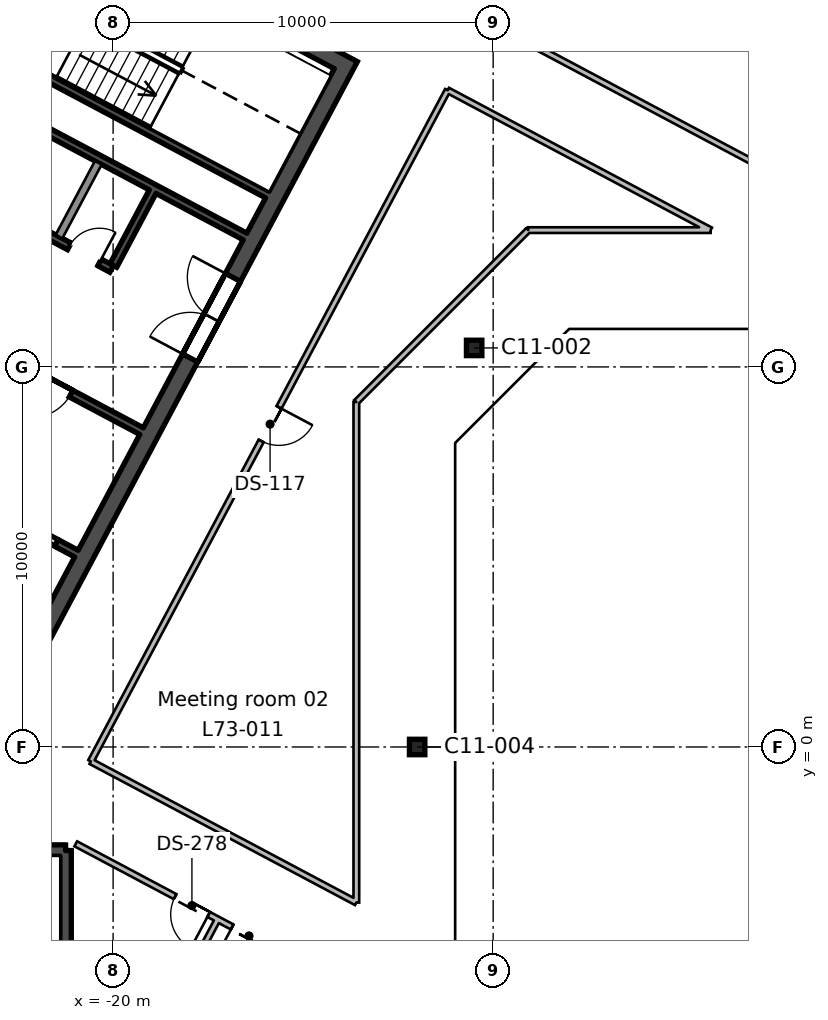
"""IFC4 building model, lengths in metres.
Left out: names, types, materials, properties, quantities, classifications, styles, units other than length and angle.
Written with IfcOpenShell. Run it as: python <this file> out.ifc"""

import sys

from ifc_helpers import new_model, si_unit, direction, frame, frame_2d, origin, origin_2d, place, context, subcontext, project, spatial, rectangle, hollow_rectangle, extrude, element, fill, save


model = new_model("IFC4")
c1 = context("Model", 3, precision=1e-05, world=origin(), true_north=direction((0.0, 1.0)))
c2 = subcontext(c1, "Body", "Model", "MODEL_VIEW")
j1 = project(units=[si_unit("LENGTHUNIT", "METRE"), si_unit("PLANEANGLEUNIT", "RADIAN")], contexts=[c1])
p1 = place(None, origin())
s1 = spatial("IfcSite", under=j1, at=p1, CompositionType="ELEMENT")
p2 = place(p1, origin())
s2 = spatial("IfcBuilding", under=s1, at=p2, CompositionType="ELEMENT")
p3 = place(p2, frame((0.0, 0.0, 320.4)))
s3 = spatial("IfcBuildingStorey", under=s2, at=p3, CompositionType="ELEMENT", Elevation=320.4)
for number, where, z_axis, x_axis in (
    (1, (-12.0, 0.0, 0.0), (0.0, 0.0, 1.0), (1.0, 0.0, 0.0)),
    (2, (-10.5, 10.5, 0.0), (0.0, 0.0, 1.0), (1.0, 0.0, 0.0)),
):
    element("IfcColumn", number, at=place(p3, frame(where, z_axis=z_axis, x_axis=x_axis)), inside=s3, PredefinedType="COLUMN", context=c2, shape_type="SweptSolid", body=[
        extrude(hollow_rectangle(XDim=0.406, YDim=0.406, WallThickness=0.009, InnerFilletRadius=0.004, OuterFilletRadius=0.013, at=origin_2d()), origin(), (0.0, 0.0, 1.0), 3.9),
    ])
p4 = place(p3, frame((-13.771, 18.138, 0.0), z_axis=(0.0, 0.0, 1.0), x_axis=(-0.469467968382, -0.882949504028, 0.0)))
e3 = element("IfcWall", 3, at=p4, inside=s3, PredefinedType="SHEAR", context=c2, shape_type="SweptSolid", body=[
    extrude(rectangle(XDim=19.1, YDim=0.45, at=frame_2d((9.55, 0.0))), origin(), (0.0, 0.0, 1.0), 3.9),
])
p5 = place(p4, frame((6.55, 0.0, 0.0)))
e4 = element("IfcOpeningElement", 4, at=p5, cuts=e3, PredefinedType="OPENING", context=c2, shape_type="SweptSolid", body=[
    extrude(rectangle(XDim=2.4, YDim=2.4, at=frame_2d((1.2, 1.2))), frame((0.0, 0.235, 0.0), z_axis=(0.0, -1.0, 0.0), x_axis=(1.0, 0.0, 0.0)), (0.0, 0.0, 1.0), 0.47),
])
p6 = place(p3, frame((-14.076, 18.045, 0.0), z_axis=(0.0, 0.0, 1.0), x_axis=(-0.882947755831, 0.46947125628, 0.0)))
e5 = element("IfcWall", 5, at=p6, inside=s3, PredefinedType="SHEAR", context=c2, shape_type="SweptSolid", body=[
    extrude(rectangle(XDim=20.2, YDim=0.45, at=frame_2d((10.1, 0.0))), origin(), (0.0, 0.0, 1.0), 3.9),
])
p7 = place(p3, frame((-18.96, 14.611, 0.0), z_axis=(0.0, 0.0, 1.0), x_axis=(-0.4694473164, -0.882960484464, 0.0)))
e6 = element("IfcWall", 6, at=p7, inside=s3, PredefinedType="SHEAR", context=c2, shape_type="SweptSolid", body=[
    extrude(rectangle(XDim=2.2, YDim=0.2, at=frame_2d((1.1, 0.0))), origin(), (0.0, 0.0, 1.0), 3.9),
])
p8 = place(p3, frame((-20.39, 15.372, 0.0), z_axis=(0.0, 0.0, 1.0), x_axis=(-0.4694473164, -0.882960484464, 0.0)))
e7 = element("IfcWall", 7, at=p8, inside=s3, PredefinedType="SOLIDWALL", context=c2, shape_type="SweptSolid", body=[
    extrude(rectangle(XDim=2.2, YDim=0.2, at=frame_2d((1.1, 0.0))), origin(), (0.0, 0.0, 1.0), 3.9),
])
p9 = place(p3, frame((-21.333, 21.649, 0.0), z_axis=(0.0, 0.0, 1.0), x_axis=(-0.469494272526, -0.882935517501, 0.0)))
e8 = element("IfcWall", 8, at=p9, inside=s3, PredefinedType="SHEAR", context=c2, shape_type="SweptSolid", body=[
    extrude(rectangle(XDim=7.3, YDim=0.2, at=frame_2d((3.65, 0.0))), origin(), (0.0, 0.0, 1.0), 3.9),
])
p10 = place(p9, frame((1.3, 0.0, 0.0)))
e9 = element("IfcOpeningElement", 9, at=p10, cuts=e8, PredefinedType="OPENING", context=c2, shape_type="SweptSolid", body=[
    extrude(rectangle(XDim=1.2, YDim=2.1, at=frame_2d((0.6, 1.05))), frame((0.0, 0.11, 0.0), z_axis=(0.0, -1.0, 0.0), x_axis=(1.0, 0.0, 0.0)), (0.0, 0.0, 1.0), 0.22),
])
p11 = place(p3, frame((-15.942, 14.536, 0.0), z_axis=(0.0, 0.0, 1.0), x_axis=(-0.882946947542, 0.469472776449, 0.0)))
e10 = element("IfcWall", 10, at=p11, inside=s3, PredefinedType="SHEAR", context=c2, shape_type="SweptSolid", body=[
    extrude(rectangle(XDim=8.0, YDim=0.2, at=frame_2d((4.0, 0.0))), origin(), (0.0, 0.0, 1.0), 3.9),
])
p12 = place(p3, frame((-16.529, 13.432, 0.0), z_axis=(0.0, 0.0, 1.0), x_axis=(-0.88295287151, 0.469461634952, 0.0)))
e11 = element("IfcWall", 11, at=p12, inside=s3, PredefinedType="SHEAR", context=c2, shape_type="SweptSolid", body=[
    extrude(rectangle(XDim=8.0, YDim=0.2, at=frame_2d((4.0, 0.0))), origin(), (0.0, 0.0, 1.0), 3.9),
])
p13 = place(p3, frame((-20.04, 12.581, 0.0), z_axis=(0.0, 0.0, 1.0), x_axis=(-0.882942972946, 0.469480251476, 0.0)))
e12 = element("IfcWall", 12, at=p13, inside=s3, PredefinedType="SHEAR", context=c2, shape_type="SweptSolid", body=[
    extrude(rectangle(XDim=5.4, YDim=0.2, at=frame_2d((2.7, 0.0))), origin(), (0.0, 0.0, 1.0), 3.9),
])
p14 = place(p13, frame((0.36, 0.0, 0.0)))
e13 = element("IfcOpeningElement", 13, at=p14, cuts=e12, PredefinedType="OPENING", context=c2, shape_type="SweptSolid", body=[
    extrude(rectangle(XDim=0.9, YDim=2.1, at=frame_2d((0.45, 1.05))), frame((0.0, 0.11, 0.0), z_axis=(0.0, -1.0, 0.0), x_axis=(1.0, 0.0, 0.0)), (0.0, 0.0, 1.0), 0.22),
])
p15 = place(p13, frame((3.06, 0.0, 0.0)))
e14 = element("IfcOpeningElement", 14, at=p15, cuts=e12, PredefinedType="OPENING", context=c2, shape_type="SweptSolid", body=[
    extrude(rectangle(XDim=0.9, YDim=2.1, at=frame_2d((0.45, 1.05))), frame((0.0, 0.11, 0.0), z_axis=(0.0, -1.0, 0.0), x_axis=(1.0, 0.0, 0.0)), (0.0, 0.0, 1.0), 0.22),
])
p16 = place(p3, frame((-19.252, 8.311, 0.0), z_axis=(0.0, 0.0, 1.0), x_axis=(-0.882955722218, 0.469456273365, 0.0)))
e15 = element("IfcWall", 15, at=p16, inside=s3, PredefinedType="SHEAR", context=c2, shape_type="SweptSolid", body=[
    extrude(rectangle(XDim=10.0, YDim=0.2, at=frame_2d((5.0, 0.0))), origin(), (0.0, 0.0, 1.0), 3.9),
])
p17 = place(p16, frame((2.1, 0.0, 0.0)))
e16 = element("IfcOpeningElement", 16, at=p17, cuts=e15, PredefinedType="OPENING", context=c2, shape_type="SweptSolid", body=[
    extrude(rectangle(XDim=1.2, YDim=2.1, at=frame_2d((0.6, 1.05))), frame((0.0, 0.11, 0.0), z_axis=(0.0, -1.0, 0.0), x_axis=(1.0, 0.0, 0.0)), (0.0, 0.0, 1.0), 0.22),
])
p18 = place(p16, frame((5.4, 0.0, 0.0)))
e17 = element("IfcOpeningElement", 17, at=p18, cuts=e15, PredefinedType="OPENING", context=c2, shape_type="SweptSolid", body=[
    extrude(rectangle(XDim=1.1, YDim=2.1, at=frame_2d((0.55, 1.05))), frame((0.0, 0.11, 0.0), z_axis=(0.0, -1.0, 0.0), x_axis=(1.0, 0.0, 0.0)), (0.0, 0.0, 1.0), 0.22),
])
p19 = place(p16, frame((8.1, 0.0, 0.0)))
e18 = element("IfcOpeningElement", 18, at=p19, cuts=e15, PredefinedType="OPENING", context=c2, shape_type="SweptSolid", body=[
    extrude(rectangle(XDim=1.1, YDim=2.1, at=frame_2d((0.55, 1.05))), frame((0.0, 0.11, 0.0), z_axis=(0.0, -1.0, 0.0), x_axis=(1.0, 0.0, 0.0)), (0.0, 0.0, 1.0), 0.22),
])
p20 = place(p3, frame((-20.965, 5.088, 0.0), z_axis=(0.0, 0.0, 1.0), x_axis=(-0.882925986334, 0.469512196493, 0.0)))
e19 = element("IfcWall", 19, at=p20, inside=s3, PredefinedType="SHEAR", context=c2, shape_type="SweptSolid", body=[
    extrude(rectangle(XDim=4.5, YDim=0.2, at=frame_2d((2.25, 0.0))), origin(), (0.0, 0.0, 1.0), 3.9),
])
p21 = place(p20, frame((0.6, 0.0, 0.0)))
e20 = element("IfcOpeningElement", 20, at=p21, cuts=e19, PredefinedType="OPENING", context=c2, shape_type="SweptSolid", body=[
    extrude(rectangle(XDim=1.1, YDim=2.1, at=frame_2d((0.55, 1.05))), frame((0.0, 0.11, 0.0), z_axis=(0.0, -1.0, 0.0), x_axis=(1.0, 0.0, 0.0)), (0.0, 0.0, 1.0), 0.22),
])
p22 = place(p3, frame((-21.25, -2.725, 0.0), z_axis=(0.0, 0.0, 1.0), x_axis=(0.0, -1.0, 0.0)))
e21 = element("IfcWall", 21, at=p22, inside=s3, PredefinedType="SHEAR", context=c2, shape_type="SweptSolid", body=[
    extrude(rectangle(XDim=3.75, YDim=0.3, at=frame_2d((1.875, 0.0))), origin(), (0.0, 0.0, 1.0), 3.9),
])
p23 = place(p3, frame((-29.55, -2.725, 0.0), z_axis=(0.0, 0.0, 1.0), x_axis=(1.0, 0.0, 0.0)))
e22 = element("IfcWall", 22, at=p23, inside=s3, PredefinedType="SHEAR", context=c2, shape_type="SweptSolid", body=[
    extrude(rectangle(XDim=8.3, YDim=0.3, at=frame_2d((4.15, 0.0))), origin(), (0.0, 0.0, 1.0), 3.9),
])
p24 = place(p23, frame((0.375, 0.0, 0.0)))
e23 = element("IfcOpeningElement", 23, at=p24, cuts=e22, PredefinedType="OPENING", context=c2, shape_type="SweptSolid", body=[
    extrude(rectangle(XDim=1.2, YDim=2.1, at=frame_2d((0.6, 1.05))), frame((0.0, 0.16, 0.0), z_axis=(0.0, -1.0, 0.0), x_axis=(1.0, 0.0, 0.0)), (0.0, 0.0, 1.0), 0.32),
])
p25 = place(p3, frame((-48.947, 39.73, 0.0), z_axis=(0.0, 0.0, 1.0), x_axis=(0.882945454821, -0.469475583828, 0.0)))
e24 = element("IfcWall", 24, at=p25, inside=s3, PredefinedType="PARTITIONING", context=c2, shape_type="SweptSolid", body=[
    extrude(rectangle(XDim=55.436, YDim=0.15, at=frame_2d((27.718, 0.0))), origin(), (0.0, 0.0, 1.0), 3.54),
])
p26 = place(p25, frame((28.35, 0.0, 0.0)))
e25 = element("IfcOpeningElement", 25, at=p26, cuts=e24, PredefinedType="OPENING", context=c2, shape_type="SweptSolid", body=[
    extrude(rectangle(XDim=1.8, YDim=2.1, at=frame_2d((0.9, 1.05))), frame((0.0, 0.085, 0.0), z_axis=(0.0, -1.0, 0.0), x_axis=(1.0, 0.0, 0.0)), (0.0, 0.0, 1.0), 0.17),
])
p27 = place(p25, frame((26.7, 0.0, 0.0)))
e26 = element("IfcOpeningElement", 26, at=p27, cuts=e24, PredefinedType="OPENING", context=c2, shape_type="SweptSolid", body=[
    extrude(rectangle(XDim=1.0, YDim=2.1, at=frame_2d((0.5, 1.05))), frame((0.0, 0.085, 0.0), z_axis=(0.0, -1.0, 0.0), x_axis=(1.0, 0.0, 0.0)), (0.0, 0.0, 1.0), 0.17),
])
p28 = place(p25, frame((15.65, 0.0, 0.0)))
e27 = element("IfcOpeningElement", 27, at=p28, cuts=e24, PredefinedType="OPENING", context=c2, shape_type="SweptSolid", body=[
    extrude(rectangle(XDim=1.0, YDim=2.1, at=frame_2d((0.5, 1.05))), frame((0.0, 0.085, 0.0), z_axis=(0.0, -1.0, 0.0), x_axis=(1.0, 0.0, 0.0)), (0.0, 0.0, 1.0), 0.17),
])
p29 = place(p3, frame((-17.248, -4.533, 0.0), z_axis=(0.0, 0.0, 1.0), x_axis=(-0.46943766298, -0.882965616871, 0.0)))
e28 = element("IfcWall", 28, at=p29, inside=s3, PredefinedType="PARTITIONING", context=c2, shape_type="SweptSolid", body=[
    extrude(rectangle(XDim=9.1, YDim=0.15, at=frame_2d((4.55, 0.0))), origin(), (0.0, 0.0, 1.0), 3.54),
])
p30 = place(p3, frame((-13.6, -6.473, 0.0), z_axis=(0.0, 0.0, 1.0), x_axis=(-0.882934197132, 0.469496755618, 0.0)))
e29 = element("IfcWall", 29, at=p30, inside=s3, PredefinedType="PARTITIONING", context=c2, shape_type="SweptSolid", body=[
    extrude(rectangle(XDim=8.362, YDim=0.15, at=frame_2d((4.181, 0.0))), origin(), (0.0, 0.0, 1.0), 3.54),
])
p31 = place(p30, frame((4.4, 0.0, 0.0)))
e30 = element("IfcOpeningElement", 30, at=p31, cuts=e29, PredefinedType="OPENING", context=c2, shape_type="SweptSolid", body=[
    extrude(rectangle(XDim=1.0, YDim=2.1, at=frame_2d((0.5, 1.05))), frame((0.0, 0.085, 0.0), z_axis=(0.0, -1.0, 0.0), x_axis=(1.0, 0.0, 0.0)), (0.0, 0.0, 1.0), 0.17),
])
p32 = place(p30, frame((2.699, 0.0, 0.0)))
e31 = element("IfcOpeningElement", 31, at=p32, cuts=e29, PredefinedType="OPENING", context=c2, shape_type="SweptSolid", body=[
    extrude(rectangle(XDim=1.0, YDim=2.1, at=frame_2d((0.5, 1.05))), frame((0.0, 0.085, 0.0), z_axis=(0.0, -1.0, 0.0), x_axis=(1.0, 0.0, 0.0)), (0.0, 0.0, 1.0), 0.17),
])
p33 = place(p3, frame((-20.588, -0.379, 0.0), z_axis=(0.0, 0.0, 1.0), x_axis=(0.469489882812, 0.882937851685, 0.0)))
e32 = element("IfcWall", 32, at=p33, inside=s3, PredefinedType="PARTITIONING", context=c2, shape_type="SweptSolid", body=[
    extrude(rectangle(XDim=20.0, YDim=0.15, at=frame_2d((10.0, 0.0))), origin(), (0.0, 0.0, 1.0), 3.54),
])
p34 = place(p33, frame((9.55, 0.0, 0.0)))
e33 = element("IfcOpeningElement", 33, at=p34, cuts=e32, PredefinedType="OPENING", context=c2, shape_type="SweptSolid", body=[
    extrude(rectangle(XDim=1.0, YDim=2.1, at=frame_2d((0.5, 1.05))), frame((0.0, 0.085, 0.0), z_axis=(0.0, -1.0, 0.0), x_axis=(1.0, 0.0, 0.0)), (0.0, 0.0, 1.0), 0.17),
])
p35 = place(p3, frame((-11.198, 17.28, 0.0), z_axis=(0.0, 0.0, 1.0), x_axis=(0.882946288452, -0.46947401601, 0.0)))
e34 = element("IfcWall", 34, at=p35, inside=s3, PredefinedType="PARTITIONING", context=c2, shape_type="SweptSolid", body=[
    extrude(rectangle(XDim=7.838, YDim=0.15, at=frame_2d((3.919, 0.0))), origin(), (0.0, 0.0, 1.0), 3.54),
])
p36 = place(p3, frame((-4.277, 13.6, 0.0), z_axis=(0.0, 0.0, 1.0), x_axis=(-1.0, 0.0, 0.0)))
e35 = element("IfcWall", 35, at=p36, inside=s3, PredefinedType="PARTITIONING", context=c2, shape_type="SweptSolid", body=[
    extrude(rectangle(XDim=4.8, YDim=0.15, at=frame_2d((2.4, 0.0))), origin(), (0.0, 0.0, 1.0), 3.54),
])
p37 = place(p3, frame((-9.077, 13.6, 0.0), z_axis=(0.0, 0.0, 1.0), x_axis=(-0.707106781187, -0.707106781187, 0.0)))
e36 = element("IfcWall", 36, at=p37, inside=s3, PredefinedType="PARTITIONING", context=c2, shape_type="SweptSolid", body=[
    extrude(rectangle(XDim=6.397, YDim=0.15, at=frame_2d((3.198, 0.0))), origin(), (0.0, 0.0, 1.0), 3.54),
])
p38 = place(p3, frame((-13.6, 9.077, 0.0), z_axis=(0.0, 0.0, 1.0), x_axis=(0.0, -1.0, 0.0)))
e37 = element("IfcWall", 37, at=p38, inside=s3, PredefinedType="PARTITIONING", context=c2, shape_type="SweptSolid", body=[
    extrude(rectangle(XDim=13.171, YDim=0.15, at=frame_2d((6.585, 0.0))), origin(), (0.0, 0.0, 1.0), 3.54),
])
p39 = place(p3, frame((-13.6, -4.094, 0.0), z_axis=(0.0, 0.0, 1.0), x_axis=(-0.882967890474, 0.469433386533, 0.0)))
e38 = element("IfcWall", 38, at=p39, inside=s3, PredefinedType="PARTITIONING", context=c2, shape_type="SweptSolid", body=[
    extrude(rectangle(XDim=7.914, YDim=0.15, at=frame_2d((3.957, 0.0))), origin(), (0.0, 0.0, 1.0), 3.54),
])
p40 = place(p5, frame((2.4, 0.0, 0.0), z_axis=(0.0, 0.0, 1.0), x_axis=(-1.0, 0.0, 0.0)))
e39 = element("IfcDoor", 39, at=p40, inside=s3, OperationType="DOUBLE_DOOR_SINGLE_SWING", PredefinedType="DOOR", context=c2, shape_type="SweptSolid", body=[
    extrude(rectangle(XDim=2.4, YDim=2.4, at=frame_2d((1.2, 1.2))), frame((0.0, 0.025, 0.0), z_axis=(0.0, -1.0, 0.0), x_axis=(1.0, 0.0, 0.0)), (0.0, 0.0, 1.0), 0.05),
])
fill(e4, e39)
p41 = place(p17, origin())
e40 = element("IfcDoor", 40, at=p41, inside=s3, OperationType="SINGLE_SWING_RIGHT", PredefinedType="DOOR", context=c2, shape_type="SweptSolid", body=[
    extrude(rectangle(XDim=1.2, YDim=2.1, at=frame_2d((0.6, 1.05))), frame((0.0, 0.025, 0.0), z_axis=(0.0, -1.0, 0.0), x_axis=(1.0, 0.0, 0.0)), (0.0, 0.0, 1.0), 0.05),
])
fill(e16, e40)
p42 = place(p14, frame((0.9, 0.0, 0.0), z_axis=(0.0, 0.0, 1.0), x_axis=(-1.0, 0.0, 0.0)))
e41 = element("IfcDoor", 41, at=p42, inside=s3, OperationType="SINGLE_SWING_RIGHT", PredefinedType="DOOR", context=c2, shape_type="SweptSolid", body=[
    extrude(rectangle(XDim=0.9, YDim=2.1, at=frame_2d((0.45, 1.05))), frame((0.0, 0.025, 0.0), z_axis=(0.0, -1.0, 0.0), x_axis=(1.0, 0.0, 0.0)), (0.0, 0.0, 1.0), 0.05),
])
fill(e13, e41)
p43 = place(p21, origin())
e42 = element("IfcDoor", 42, at=p43, inside=s3, OperationType="DOUBLE_DOOR_SLIDING", PredefinedType="DOOR", context=c2, shape_type="SweptSolid", body=[
    extrude(rectangle(XDim=1.1, YDim=2.1, at=frame_2d((0.55, 1.05))), frame((0.0, 0.025, 0.0), z_axis=(0.0, -1.0, 0.0), x_axis=(1.0, 0.0, 0.0)), (0.0, 0.0, 1.0), 0.05),
])
fill(e20, e42)
p44 = place(p34, frame((1.0, 0.0, 0.0), z_axis=(0.0, 0.0, 1.0), x_axis=(-1.0, 0.0, 0.0)))
e43 = element("IfcDoor", 43, at=p44, inside=s3, OperationType="SINGLE_SWING_LEFT", PredefinedType="DOOR", context=c2, shape_type="SweptSolid", body=[
    extrude(rectangle(XDim=1.0, YDim=2.1, at=frame_2d((0.5, 1.05))), frame((0.0, 0.025, 0.0), z_axis=(0.0, -1.0, 0.0), x_axis=(1.0, 0.0, 0.0)), (0.0, 0.0, 1.0), 0.05),
])
fill(e33, e43)
p45 = place(p31, origin())
e44 = element("IfcDoor", 44, at=p45, inside=s3, OperationType="SINGLE_SWING_LEFT", PredefinedType="DOOR", context=c2, shape_type="SweptSolid", body=[
    extrude(rectangle(XDim=1.0, YDim=2.1, at=frame_2d((0.5, 1.05))), frame((0.0, 0.025, 0.0), z_axis=(0.0, -1.0, 0.0), x_axis=(1.0, 0.0, 0.0)), (0.0, 0.0, 1.0), 0.05),
])
fill(e30, e44)
p46 = place(p32, origin())
e45 = element("IfcDoor", 45, at=p46, inside=s3, OperationType="SINGLE_SWING_RIGHT", PredefinedType="DOOR", context=c2, shape_type="SweptSolid", body=[
    extrude(rectangle(XDim=1.0, YDim=2.1, at=frame_2d((0.5, 1.05))), frame((0.0, 0.025, 0.0), z_axis=(0.0, -1.0, 0.0), x_axis=(1.0, 0.0, 0.0)), (0.0, 0.0, 1.0), 0.05),
])
fill(e31, e45)
save(model, sys.argv[1])
